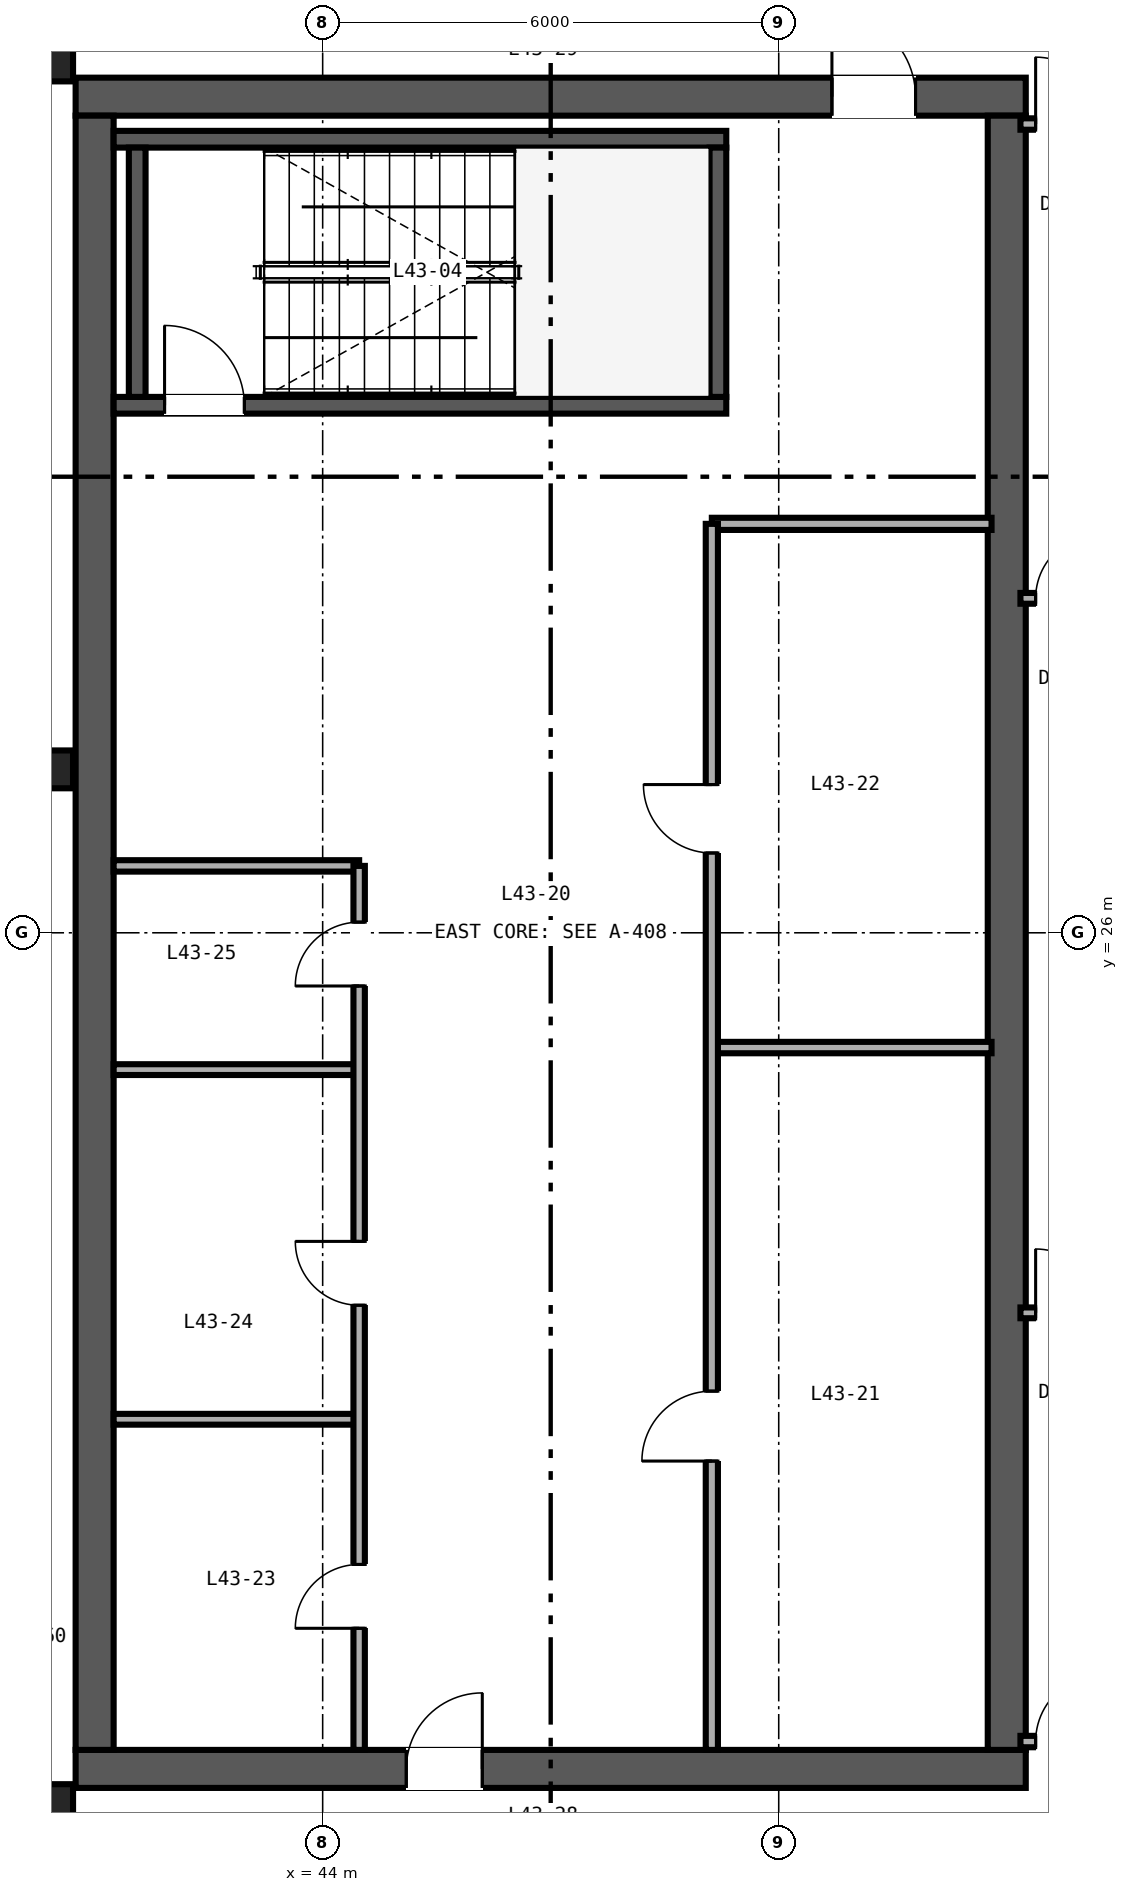
"""IFC4 building model, lengths in metres.
Left out: names, types, materials, properties, quantities, classifications, styles, units other than length and angle.
Written with IfcOpenShell. Run it as: python <this file> out.ifc"""

import sys

from ifc_helpers import new_model, si_unit, direction, frame, frame_2d, origin, origin_2d, place, context, subcontext, project, spatial, rectangle, i_section, extrude, source, transform, mapped, element, fill, save


model = new_model("IFC4")
c1 = context("Model", 3, precision=1e-05, world=origin(), true_north=direction((0.0, 1.0)))
c2 = subcontext(c1, "Body", "Model", "MODEL_VIEW")
j1 = project(units=[si_unit("LENGTHUNIT", "METRE"), si_unit("PLANEANGLEUNIT", "RADIAN")], contexts=[c1])
p1 = place(None, origin())
s1 = spatial("IfcSite", under=j1, at=p1, CompositionType="ELEMENT")
p2 = place(p1, origin())
s2 = spatial("IfcBuilding", under=s1, at=p2, CompositionType="ELEMENT")
p3 = place(p2, frame((0.0, 0.0, 174.0)))
s3 = spatial("IfcBuildingStorey", under=s2, at=p3, CompositionType="ELEMENT", Elevation=174.0)
p4 = place(p3, frame((40.75, 15.0, 0.0), z_axis=(0.0, 0.0, 1.0), x_axis=(1.0, 0.0, 0.0)))
e1 = element("IfcWall", 1, at=p4, inside=s3, PredefinedType="SHEAR", context=c2, shape_type="SweptSolid", body=[
    extrude(rectangle(XDim=12.5, YDim=0.5, at=frame_2d((6.25, 0.0))), origin(), (0.0, 0.0, 1.0), 3.37),
])
p5 = place(p4, frame((4.35, 0.0, 0.0)))
e2 = element("IfcOpeningElement", 2, at=p5, cuts=e1, PredefinedType="OPENING", context=c2, shape_type="SweptSolid", body=[
    extrude(rectangle(XDim=1.0, YDim=2.15, at=frame_2d((0.5, 1.075))), frame((0.0, 0.26, 0.0), z_axis=(0.0, -1.0, 0.0), x_axis=(1.0, 0.0, 0.0)), (0.0, 0.0, 1.0), 0.52),
])
p6 = place(p3, frame((40.75, 37.0, 0.0), z_axis=(0.0, 0.0, 1.0), x_axis=(1.0, 0.0, 0.0)))
e3 = element("IfcWall", 3, at=p6, inside=s3, PredefinedType="SHEAR", context=c2, shape_type="SweptSolid", body=[
    extrude(rectangle(XDim=12.5, YDim=0.5, at=frame_2d((6.25, 0.0))), origin(), (0.0, 0.0, 1.0), 3.37),
])
p7 = place(p6, frame((9.95, 0.0, 0.0)))
e4 = element("IfcOpeningElement", 4, at=p7, cuts=e3, PredefinedType="OPENING", context=c2, shape_type="SweptSolid", body=[
    extrude(rectangle(XDim=1.1, YDim=2.15, at=frame_2d((0.55, 1.075))), frame((0.0, 0.26, 0.0), z_axis=(0.0, -1.0, 0.0), x_axis=(1.0, 0.0, 0.0)), (0.0, 0.0, 1.0), 0.52),
])
for number, where, z_axis, x_axis in (
    (5, (41.0, 15.25, 0.0), (0.0, 0.0, 1.0), (0.0, 1.0, 0.0)),
    (6, (53.0, 15.25, 0.0), (0.0, 0.0, 1.0), (0.0, 1.0, 0.0)),
):
    element("IfcWall", number, at=place(p3, frame(where, z_axis=z_axis, x_axis=x_axis)), inside=s3, PredefinedType="SHEAR", context=c2, shape_type="SweptSolid", body=[
        extrude(rectangle(XDim=21.5, YDim=0.5, at=frame_2d((10.75, 0.0))), origin(), (0.0, 0.0, 1.0), 3.37),
    ])
p8 = place(p3, frame((41.25, 32.94, 0.0), z_axis=(0.0, 0.0, 1.0), x_axis=(1.0, 0.0, 0.0)))
e7 = element("IfcWall", 7, at=p8, inside=s3, PredefinedType="SHEAR", context=c2, shape_type="SweptSolid", body=[
    extrude(rectangle(XDim=8.06, YDim=0.22, at=frame_2d((4.03, 0.0))), origin(), (0.0, 0.0, 1.0), 3.4),
])
p9 = place(p8, frame((0.67, 0.0, 0.0)))
e8 = element("IfcOpeningElement", 8, at=p9, cuts=e7, PredefinedType="OPENING", context=c2, shape_type="SweptSolid", body=[
    extrude(rectangle(XDim=1.05, YDim=2.15, at=frame_2d((0.525, 1.075))), frame((0.0, 0.12, 0.0), z_axis=(0.0, -1.0, 0.0), x_axis=(1.0, 0.0, 0.0)), (0.0, 0.0, 1.0), 0.24),
])
p10 = place(p3, frame((41.25, 36.44, 0.0), z_axis=(0.0, 0.0, 1.0), x_axis=(1.0, 0.0, 0.0)))
e9 = element("IfcWall", 9, at=p10, inside=s3, PredefinedType="SHEAR", context=c2, shape_type="SweptSolid", body=[
    extrude(rectangle(XDim=8.06, YDim=0.22, at=frame_2d((4.03, 0.0))), origin(), (0.0, 0.0, 1.0), 3.4),
])
for number, where, z_axis, x_axis in (
    (10, (41.56, 33.05, 0.0), (0.0, 0.0, 1.0), (0.0, 1.0, 0.0)),
    (11, (49.2, 33.05, 0.0), (0.0, 0.0, 1.0), (0.0, 1.0, 0.0)),
):
    element("IfcWall", number, at=place(p3, frame(where, z_axis=z_axis, x_axis=x_axis)), inside=s3, PredefinedType="SHEAR", context=c2, shape_type="SweptSolid", body=[
        extrude(rectangle(XDim=3.28, YDim=0.22, at=frame_2d((1.64, 0.0))), origin(), (0.0, 0.0, 1.0), 3.4),
    ])
m1 = source(origin(), c2, "Body", "SweptSolid", [
    extrude(i_section(OverallWidth=0.432, OverallDepth=0.498, WebThickness=0.056, FlangeThickness=0.089, FilletRadius=0.025, at=origin_2d()), origin(), (0.0, 0.0, 1.0), 3.37),
])
for number, where, z_axis, x_axis in (
    (12, (40.5, 14.55, 0.0), (0.0, 0.0, 1.0), (1.0, 0.0, 0.0)),
    (13, (40.5, 28.15, 0.0), (0.0, 0.0, 1.0), (1.0, 0.0, 0.0)),
    (14, (40.5, 37.45, 0.0), (0.0, 0.0, 1.0), (1.0, 0.0, 0.0)),
):
    element("IfcColumn", number, at=place(p3, frame(where, z_axis=z_axis, x_axis=x_axis)), inside=s3, PredefinedType="COLUMN", context=c2, shape_type="MappedRepresentation", body=[
        mapped(m1, transform((0.0, 0.0, 0.0), scale=1.0)),
    ])
p11 = place(p3, frame((49.12, 31.38, 0.0), z_axis=(0.0, 0.0, 1.0), x_axis=(1.0, 0.0, 0.0)))
e15 = element("IfcWall", 15, at=p11, inside=s3, PredefinedType="PARTITIONING", context=c2, shape_type="SweptSolid", body=[
    extrude(rectangle(XDim=3.68, YDim=0.16, at=frame_2d((1.84, 0.0))), origin(), (0.0, 0.0, 1.0), 2.47),
])
p12 = place(p3, frame((49.12, 24.49, 0.0), z_axis=(0.0, 0.0, 1.0), x_axis=(1.0, 0.0, 0.0)))
e16 = element("IfcWall", 16, at=p12, inside=s3, PredefinedType="PARTITIONING", context=c2, shape_type="SweptSolid", body=[
    extrude(rectangle(XDim=3.68, YDim=0.15, at=frame_2d((1.84, 0.0))), origin(), (0.0, 0.0, 1.0), 3.37),
])
p13 = place(p3, frame((49.12, 15.25, 0.0), z_axis=(0.0, 0.0, 1.0), x_axis=(0.0, 1.0, 0.0)))
e17 = element("IfcWall", 17, at=p13, inside=s3, PredefinedType="PARTITIONING", context=c2, shape_type="SweptSolid", body=[
    extrude(rectangle(XDim=16.13, YDim=0.16, at=frame_2d((8.065, 0.0))), origin(), (0.0, 0.0, 1.0), 2.443),
])
p14 = place(p13, frame((3.8, 0.0, 0.0)))
e18 = element("IfcOpeningElement", 18, at=p14, cuts=e17, PredefinedType="OPENING", context=c2, shape_type="SweptSolid", body=[
    extrude(rectangle(XDim=0.92, YDim=2.15, at=frame_2d((0.46, 1.075))), frame((0.0, 0.09, 0.0), z_axis=(0.0, -1.0, 0.0), x_axis=(1.0, 0.0, 0.0)), (0.0, 0.0, 1.0), 0.18),
])
p15 = place(p13, frame((11.8, 0.0, 0.0)))
e19 = element("IfcOpeningElement", 19, at=p15, cuts=e17, PredefinedType="OPENING", context=c2, shape_type="SweptSolid", body=[
    extrude(rectangle(XDim=0.9, YDim=2.15, at=frame_2d((0.45, 1.075))), frame((0.0, 0.09, 0.0), z_axis=(0.0, -1.0, 0.0), x_axis=(1.0, 0.0, 0.0)), (0.0, 0.0, 1.0), 0.18),
])
p16 = place(p3, frame((41.25, 26.88, 0.0), z_axis=(0.0, 0.0, 1.0), x_axis=(1.0, 0.0, 0.0)))
e20 = element("IfcWall", 20, at=p16, inside=s3, PredefinedType="PARTITIONING", context=c2, shape_type="SweptSolid", body=[
    extrude(rectangle(XDim=3.23, YDim=0.15, at=frame_2d((1.615, 0.0))), origin(), (0.0, 0.0, 1.0), 3.37),
])
for number, where, z_axis, x_axis in (
    (21, (41.25, 19.6, 0.0), (0.0, 0.0, 1.0), (1.0, 0.0, 0.0)),
    (22, (41.25, 24.2, 0.0), (0.0, 0.0, 1.0), (1.0, 0.0, 0.0)),
):
    element("IfcWall", number, at=place(p3, frame(where, z_axis=z_axis, x_axis=x_axis)), inside=s3, PredefinedType="PARTITIONING", context=c2, shape_type="SweptSolid", body=[
        extrude(rectangle(XDim=3.23, YDim=0.142, at=frame_2d((1.615, 0.0))), origin(), (0.0, 0.0, 1.0), 3.37),
    ])
p17 = place(p3, frame((44.48, 15.25, 0.0), z_axis=(0.0, 0.0, 1.0), x_axis=(0.0, 1.0, 0.0)))
e23 = element("IfcWall", 23, at=p17, inside=s3, PredefinedType="PARTITIONING", context=c2, shape_type="SweptSolid", body=[
    extrude(rectangle(XDim=11.63, YDim=0.15, at=frame_2d((5.815, 0.0))), origin(), (0.0, 0.0, 1.0), 3.37),
])
p18 = place(p17, frame((1.6, 0.0, 0.0)))
e24 = element("IfcOpeningElement", 24, at=p18, cuts=e23, PredefinedType="OPENING", context=c2, shape_type="SweptSolid", body=[
    extrude(rectangle(XDim=0.84, YDim=2.1, at=frame_2d((0.42, 1.05))), frame((0.0, 0.085, 0.0), z_axis=(0.0, -1.0, 0.0), x_axis=(1.0, 0.0, 0.0)), (0.0, 0.0, 1.0), 0.17),
])
p19 = place(p17, frame((5.85, 0.0, 0.0)))
e25 = element("IfcOpeningElement", 25, at=p19, cuts=e23, PredefinedType="OPENING", context=c2, shape_type="SweptSolid", body=[
    extrude(rectangle(XDim=0.84, YDim=2.1, at=frame_2d((0.42, 1.05))), frame((0.0, 0.085, 0.0), z_axis=(0.0, -1.0, 0.0), x_axis=(1.0, 0.0, 0.0)), (0.0, 0.0, 1.0), 0.17),
])
p20 = place(p17, frame((10.05, 0.0, 0.0)))
e26 = element("IfcOpeningElement", 26, at=p20, cuts=e23, PredefinedType="OPENING", context=c2, shape_type="SweptSolid", body=[
    extrude(rectangle(XDim=0.84, YDim=2.1, at=frame_2d((0.42, 1.05))), frame((0.0, 0.085, 0.0), z_axis=(0.0, -1.0, 0.0), x_axis=(1.0, 0.0, 0.0)), (0.0, 0.0, 1.0), 0.17),
])
p21 = place(p3, frame((53.18, 15.36, 0.0), z_axis=(0.0, 0.0, 1.0), x_axis=(1.0, 0.0, 0.0)))
e27 = element("IfcWall", 27, at=p21, inside=s3, PredefinedType="PARTITIONING", context=c2, shape_type="SweptSolid", body=[
    extrude(rectangle(XDim=2.66, YDim=0.15, at=frame_2d((1.33, 0.0))), origin(), (0.0, 0.0, 1.0), 2.591),
])
p22 = place(p21, frame((0.2, 0.0, 0.0)))
e28 = element("IfcOpeningElement", 28, at=p22, cuts=e27, PredefinedType="OPENING", context=c2, shape_type="SweptSolid", body=[
    extrude(rectangle(XDim=0.88, YDim=2.15, at=frame_2d((0.44, 1.075))), frame((0.0, 0.085, 0.0), z_axis=(0.0, -1.0, 0.0), x_axis=(1.0, 0.0, 0.0)), (0.0, 0.0, 1.0), 0.17),
])
p23 = place(p3, frame((53.18, 36.64, 0.0), z_axis=(0.0, 0.0, 1.0), x_axis=(1.0, 0.0, 0.0)))
e29 = element("IfcWall", 29, at=p23, inside=s3, PredefinedType="PARTITIONING", context=c2, shape_type="SweptSolid", body=[
    extrude(rectangle(XDim=2.66, YDim=0.15, at=frame_2d((1.33, 0.0))), origin(), (0.0, 0.0, 1.0), 2.753),
])
p24 = place(p23, frame((0.2, 0.0, 0.0)))
e30 = element("IfcOpeningElement", 30, at=p24, cuts=e29, PredefinedType="OPENING", context=c2, shape_type="SweptSolid", body=[
    extrude(rectangle(XDim=0.88, YDim=2.15, at=frame_2d((0.44, 1.075))), frame((0.0, 0.085, 0.0), z_axis=(0.0, -1.0, 0.0), x_axis=(1.0, 0.0, 0.0)), (0.0, 0.0, 1.0), 0.17),
])
p25 = place(p3, frame((53.18, 21.0, 0.0), z_axis=(0.0, 0.0, 1.0), x_axis=(1.0, 0.0, 0.0)))
e31 = element("IfcWall", 31, at=p25, inside=s3, PredefinedType="PARTITIONING", context=c2, shape_type="SweptSolid", body=[
    extrude(rectangle(XDim=2.66, YDim=0.142, at=frame_2d((1.33, 0.0))), origin(), (0.0, 0.0, 1.0), 2.591),
])
p26 = place(p25, frame((0.2, 0.0, 0.0)))
e32 = element("IfcOpeningElement", 32, at=p26, cuts=e31, PredefinedType="OPENING", context=c2, shape_type="SweptSolid", body=[
    extrude(rectangle(XDim=0.84, YDim=2.1, at=frame_2d((0.42, 1.05))), frame((0.0, 0.081, 0.0), z_axis=(0.0, -1.0, 0.0), x_axis=(1.0, 0.0, 0.0)), (0.0, 0.0, 1.0), 0.162),
])
p27 = place(p3, frame((53.18, 30.4, 0.0), z_axis=(0.0, 0.0, 1.0), x_axis=(1.0, 0.0, 0.0)))
e33 = element("IfcWall", 33, at=p27, inside=s3, PredefinedType="PARTITIONING", context=c2, shape_type="SweptSolid", body=[
    extrude(rectangle(XDim=2.66, YDim=0.142, at=frame_2d((1.33, 0.0))), origin(), (0.0, 0.0, 1.0), 2.753),
])
p28 = place(p27, frame((0.2, 0.0, 0.0)))
e34 = element("IfcOpeningElement", 34, at=p28, cuts=e33, PredefinedType="OPENING", context=c2, shape_type="SweptSolid", body=[
    extrude(rectangle(XDim=0.84, YDim=2.1, at=frame_2d((0.42, 1.05))), frame((0.0, 0.081, 0.0), z_axis=(0.0, -1.0, 0.0), x_axis=(1.0, 0.0, 0.0)), (0.0, 0.0, 1.0), 0.162),
])
m2 = source(origin(), c2, "Body", "SweptSolid", [
    extrude(rectangle(XDim=1.05, YDim=2.15, at=frame_2d((0.525, 1.075))), frame((0.0, 0.025, 0.0), z_axis=(0.0, -1.0, 0.0), x_axis=(1.0, 0.0, 0.0)), (0.0, 0.0, 1.0), 0.05),
])
p29 = place(p9, origin())
e35 = element("IfcDoor", 35, at=p29, inside=s3, OperationType="SINGLE_SWING_LEFT", PredefinedType="DOOR", context=c2, shape_type="MappedRepresentation", body=[
    mapped(m2, transform((0.0, 0.0, 0.0), scale=1.0)),
])
fill(e8, e35)
m3 = source(origin(), c2, "Body", "SweptSolid", [
    extrude(rectangle(XDim=1.0, YDim=2.15, at=frame_2d((0.5, 1.075))), frame((0.0, 0.025, 0.0), z_axis=(0.0, -1.0, 0.0), x_axis=(1.0, 0.0, 0.0)), (0.0, 0.0, 1.0), 0.05),
])
p30 = place(p5, origin())
e36 = element("IfcDoor", 36, at=p30, inside=s3, OperationType="SINGLE_SWING_RIGHT", PredefinedType="DOOR", context=c2, shape_type="MappedRepresentation", body=[
    mapped(m3, transform((0.0, 0.0, 0.0), scale=1.0)),
])
fill(e2, e36)
m4 = source(origin(), c2, "Body", "SweptSolid", [
    extrude(rectangle(XDim=1.1, YDim=2.15, at=frame_2d((0.55, 1.075))), frame((0.0, 0.025, 0.0), z_axis=(0.0, -1.0, 0.0), x_axis=(1.0, 0.0, 0.0)), (0.0, 0.0, 1.0), 0.05),
])
p31 = place(p7, origin())
e37 = element("IfcDoor", 37, at=p31, inside=s3, OperationType="SINGLE_SWING_LEFT", PredefinedType="DOOR", context=c2, shape_type="MappedRepresentation", body=[
    mapped(m4, transform((0.0, 0.0, 0.0), scale=1.0)),
])
fill(e4, e37)
m5 = source(origin(), c2, "Body", "SweptSolid", [
    extrude(rectangle(XDim=0.92, YDim=2.15, at=frame_2d((0.46, 1.075))), frame((0.0, 0.025, 0.0), z_axis=(0.0, -1.0, 0.0), x_axis=(1.0, 0.0, 0.0)), (0.0, 0.0, 1.0), 0.05),
])
p32 = place(p14, origin())
e38 = element("IfcDoor", 38, at=p32, inside=s3, OperationType="SINGLE_SWING_LEFT", PredefinedType="DOOR", context=c2, shape_type="MappedRepresentation", body=[
    mapped(m5, transform((0.0, 0.0, 0.0), scale=1.0)),
])
fill(e18, e38)
m6 = source(origin(), c2, "Body", "SweptSolid", [
    extrude(rectangle(XDim=0.9, YDim=2.15, at=frame_2d((0.45, 1.075))), frame((0.0, 0.025, 0.0), z_axis=(0.0, -1.0, 0.0), x_axis=(1.0, 0.0, 0.0)), (0.0, 0.0, 1.0), 0.05),
])
p33 = place(p15, origin())
e39 = element("IfcDoor", 39, at=p33, inside=s3, OperationType="SINGLE_SWING_RIGHT", PredefinedType="DOOR", context=c2, shape_type="MappedRepresentation", body=[
    mapped(m6, transform((0.0, 0.0, 0.0), scale=1.0)),
])
fill(e19, e39)
m7 = source(origin(), c2, "Body", "SweptSolid", [
    extrude(rectangle(XDim=0.84, YDim=2.1, at=frame_2d((0.42, 1.05))), frame((0.0, 0.025, 0.0), z_axis=(0.0, -1.0, 0.0), x_axis=(1.0, 0.0, 0.0)), (0.0, 0.0, 1.0), 0.05),
])
p34 = place(p18, origin())
e40 = element("IfcDoor", 40, at=p34, inside=s3, OperationType="SINGLE_SWING_LEFT", PredefinedType="DOOR", context=c2, shape_type="MappedRepresentation", body=[
    mapped(m7, transform((0.0, 0.0, 0.0), scale=1.0)),
])
fill(e24, e40)
p35 = place(p19, origin())
e41 = element("IfcDoor", 41, at=p35, inside=s3, OperationType="SINGLE_SWING_RIGHT", PredefinedType="DOOR", context=c2, shape_type="MappedRepresentation", body=[
    mapped(m7, transform((0.0, 0.0, 0.0), scale=1.0)),
])
fill(e25, e41)
p36 = place(p20, origin())
e42 = element("IfcDoor", 42, at=p36, inside=s3, OperationType="SINGLE_SWING_LEFT", PredefinedType="DOOR", context=c2, shape_type="MappedRepresentation", body=[
    mapped(m7, transform((0.0, 0.0, 0.0), scale=1.0)),
])
fill(e26, e42)
m8 = source(origin(), c2, "Body", "SweptSolid", [
    extrude(rectangle(XDim=0.88, YDim=2.15, at=frame_2d((0.44, 1.075))), frame((0.0, 0.025, 0.0), z_axis=(0.0, -1.0, 0.0), x_axis=(1.0, 0.0, 0.0)), (0.0, 0.0, 1.0), 0.05),
])
p37 = place(p22, origin())
e43 = element("IfcDoor", 43, at=p37, inside=s3, OperationType="SINGLE_SWING_RIGHT", PredefinedType="DOOR", context=c2, shape_type="MappedRepresentation", body=[
    mapped(m8, transform((0.0, 0.0, 0.0), scale=1.0)),
])
fill(e28, e43)
p38 = place(p24, origin())
e44 = element("IfcDoor", 44, at=p38, inside=s3, OperationType="SINGLE_SWING_LEFT", PredefinedType="DOOR", context=c2, shape_type="MappedRepresentation", body=[
    mapped(m8, transform((0.0, 0.0, 0.0), scale=1.0)),
])
fill(e30, e44)
p39 = place(p26, origin())
e45 = element("IfcDoor", 45, at=p39, inside=s3, OperationType="SINGLE_SWING_LEFT", PredefinedType="DOOR", context=c2, shape_type="MappedRepresentation", body=[
    mapped(m7, transform((0.0, 0.0, 0.0), scale=1.0)),
])
fill(e32, e45)
p40 = place(p28, origin())
e46 = element("IfcDoor", 46, at=p40, inside=s3, OperationType="SINGLE_SWING_RIGHT", PredefinedType="DOOR", context=c2, shape_type="MappedRepresentation", body=[
    mapped(m7, transform((0.0, 0.0, 0.0), scale=1.0)),
])
fill(e34, e46)
save(model, sys.argv[1])
